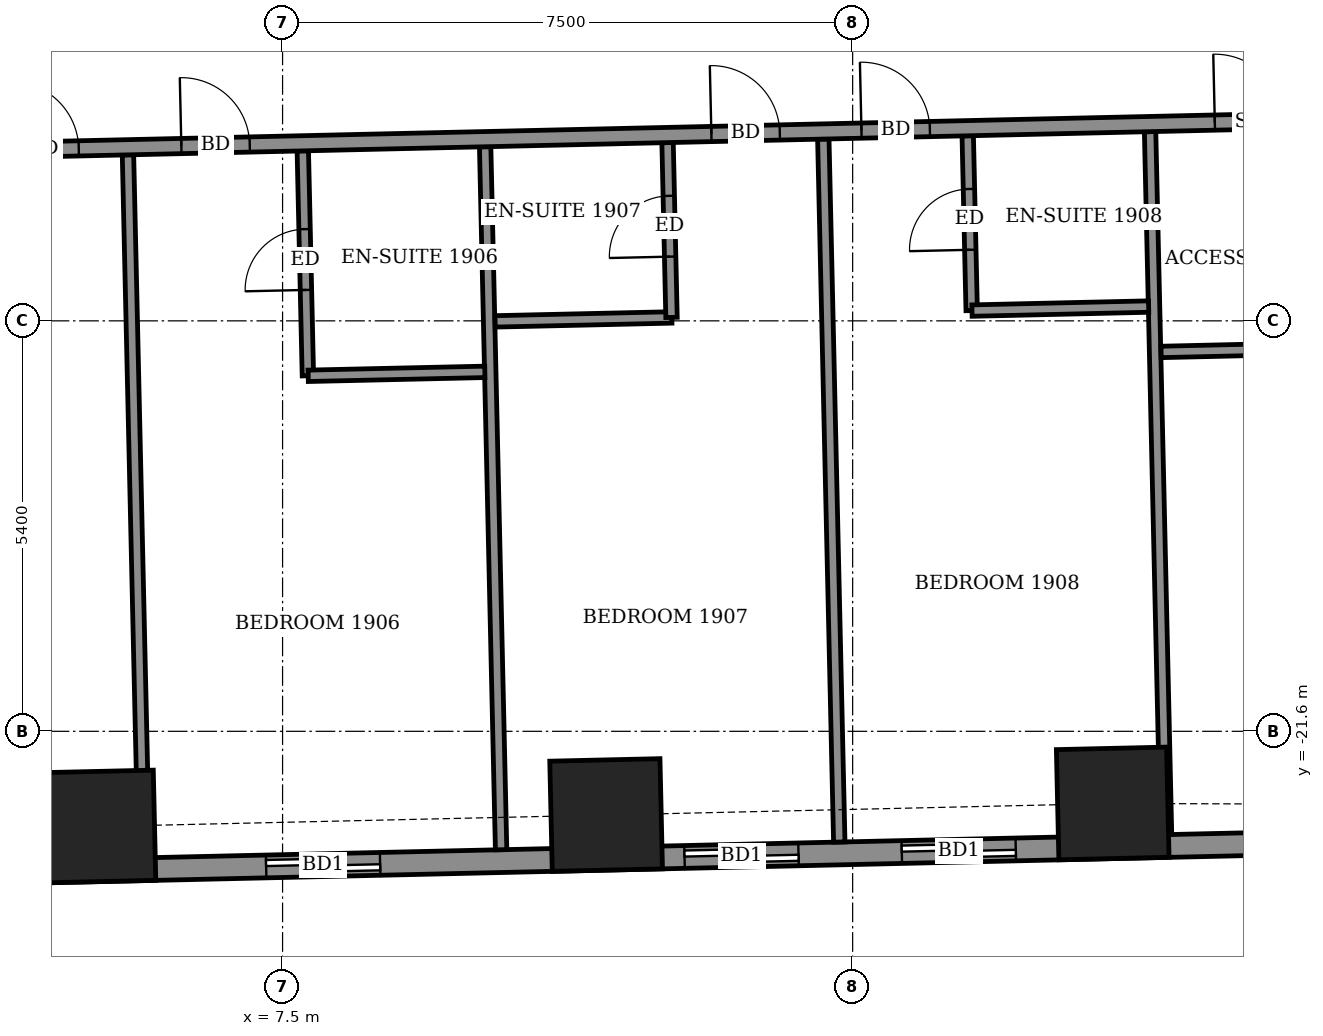
"""IFC4 building model, lengths in metres.
Left out: names, types, materials, properties, quantities, classifications, styles, units other than length and angle.
Written with IfcOpenShell. Run it as: python <this file> out.ifc"""

import sys

from ifc_helpers import new_model, si_unit, direction, frame, frame_2d, origin, origin_2d, place, context, subcontext, project, spatial, rectangle, extrude, element, fill, save


model = new_model("IFC4")
c1 = context("Model", 3, precision=1e-05, world=origin(), true_north=direction((0.0, 1.0)))
c2 = subcontext(c1, "Body", "Model", "MODEL_VIEW")
j1 = project(units=[si_unit("LENGTHUNIT", "METRE"), si_unit("PLANEANGLEUNIT", "RADIAN")], contexts=[c1])
p1 = place(None, origin())
s1 = spatial("IfcSite", under=j1, at=p1, CompositionType="ELEMENT")
p2 = place(p1, origin())
s2 = spatial("IfcBuilding", under=s1, at=p2, CompositionType="ELEMENT")
p3 = place(p2, frame((0.0, 0.0, 79.3)))
s3 = spatial("IfcBuildingStorey", under=s2, at=p3, CompositionType="ELEMENT", Elevation=79.3)
for number, where, z_axis, x_axis in (
    (1, (5.091, -22.852, -0.55), (0.0, 0.0, 1.0), (1.0, 0.023, 0.0)),
    (2, (11.757, -22.701, -0.55), (0.0, 0.0, 1.0), (1.0, 0.023, 0.0)),
    (3, (18.422, -22.549, -0.55), (0.0, 0.0, 1.0), (1.0, 0.023, 0.0)),
):
    element("IfcColumn", number, at=place(p3, frame(where, z_axis=z_axis, x_axis=x_axis)), inside=s3, PredefinedType="COLUMN", context=c2, shape_type="SweptSolid", body=[
        extrude(rectangle(XDim=1.45, YDim=1.45, at=origin_2d()), origin(), (0.0, 0.0, 1.0), 3.6),
    ])
p4 = place(p3, frame((-21.409, -24.029, 0.0), z_axis=(0.0, 0.0, 1.0), x_axis=(0.999742634032, 0.022686244721, 0.0)))
e4 = element("IfcWall", 4, at=p4, inside=s3, PredefinedType="SOLIDWALL", context=c2, shape_type="SweptSolid", body=[
    extrude(rectangle(XDim=46.372, YDim=0.3, at=frame_2d((23.186, 0.0))), origin(), (0.0, 0.0, 1.0), 3.05),
])
p5 = place(p4, frame((1.985, 0.0, 0.0)))
e5 = element("IfcOpeningElement", 5, at=p5, cuts=e4, PredefinedType="OPENING", context=c2, shape_type="SweptSolid", body=[
    extrude(rectangle(XDim=1.5, YDim=2.4, at=frame_2d((0.75, 1.2))), frame((0.0, 0.16, 0.0), z_axis=(0.0, -1.0, 0.0), x_axis=(1.0, 0.0, 0.0)), (0.0, 0.0, 1.0), 0.32),
])
p6 = place(p4, frame((7.371, 0.0, 0.0)))
e6 = element("IfcOpeningElement", 6, at=p6, cuts=e4, PredefinedType="OPENING", context=c2, shape_type="SweptSolid", body=[
    extrude(rectangle(XDim=1.2, YDim=2.4, at=frame_2d((0.6, 1.2))), frame((0.0, 0.16, 0.0), z_axis=(0.0, -1.0, 0.0), x_axis=(1.0, 0.0, 0.0)), (0.0, 0.0, 1.0), 0.32),
])
p7 = place(p4, frame((10.08, 0.0, 0.0)))
e7 = element("IfcOpeningElement", 7, at=p7, cuts=e4, PredefinedType="OPENING", context=c2, shape_type="SweptSolid", body=[
    extrude(rectangle(XDim=1.5, YDim=2.4, at=frame_2d((0.75, 1.2))), frame((0.0, 0.16, 0.0), z_axis=(0.0, -1.0, 0.0), x_axis=(1.0, 0.0, 0.0)), (0.0, 0.0, 1.0), 0.32),
])
p8 = place(p4, frame((15.08, 0.0, 0.0)))
e8 = element("IfcOpeningElement", 8, at=p8, cuts=e4, PredefinedType="OPENING", context=c2, shape_type="SweptSolid", body=[
    extrude(rectangle(XDim=1.5, YDim=2.4, at=frame_2d((0.75, 1.2))), frame((0.0, 0.16, 0.0), z_axis=(0.0, -1.0, 0.0), x_axis=(1.0, 0.0, 0.0)), (0.0, 0.0, 1.0), 0.32),
])
p9 = place(p4, frame((20.813, 0.0, 0.0)))
e9 = element("IfcOpeningElement", 9, at=p9, cuts=e4, PredefinedType="OPENING", context=c2, shape_type="SweptSolid", body=[
    extrude(rectangle(XDim=1.2, YDim=2.4, at=frame_2d((0.6, 1.2))), frame((0.0, 0.16, 0.0), z_axis=(0.0, -1.0, 0.0), x_axis=(1.0, 0.0, 0.0)), (0.0, 0.0, 1.0), 0.32),
])
p10 = place(p4, frame((23.522, 0.0, 0.0)))
e10 = element("IfcOpeningElement", 10, at=p10, cuts=e4, PredefinedType="OPENING", context=c2, shape_type="SweptSolid", body=[
    extrude(rectangle(XDim=1.5, YDim=2.4, at=frame_2d((0.75, 1.2))), frame((0.0, 0.16, 0.0), z_axis=(0.0, -1.0, 0.0), x_axis=(1.0, 0.0, 0.0)), (0.0, 0.0, 1.0), 0.32),
])
p11 = place(p4, frame((28.7, 0.0, 0.0)))
e11 = element("IfcOpeningElement", 11, at=p11, cuts=e4, PredefinedType="OPENING", context=c2, shape_type="SweptSolid", body=[
    extrude(rectangle(XDim=1.5, YDim=2.4, at=frame_2d((0.75, 1.2))), frame((0.0, 0.16, 0.0), z_axis=(0.0, -1.0, 0.0), x_axis=(1.0, 0.0, 0.0)), (0.0, 0.0, 1.0), 0.32),
])
p12 = place(p4, frame((34.206, 0.0, 0.0)))
e12 = element("IfcOpeningElement", 12, at=p12, cuts=e4, PredefinedType="OPENING", context=c2, shape_type="SweptSolid", body=[
    extrude(rectangle(XDim=1.5, YDim=2.4, at=frame_2d((0.75, 1.2))), frame((0.0, 0.16, 0.0), z_axis=(0.0, -1.0, 0.0), x_axis=(1.0, 0.0, 0.0)), (0.0, 0.0, 1.0), 0.32),
])
p13 = place(p4, frame((37.065, 0.0, 0.0)))
e13 = element("IfcOpeningElement", 13, at=p13, cuts=e4, PredefinedType="OPENING", context=c2, shape_type="SweptSolid", body=[
    extrude(rectangle(XDim=1.5, YDim=2.4, at=frame_2d((0.75, 1.2))), frame((0.0, 0.16, 0.0), z_axis=(0.0, -1.0, 0.0), x_axis=(1.0, 0.0, 0.0)), (0.0, 0.0, 1.0), 0.32),
])
p14 = place(p4, frame((41.698, 0.0, 0.9)))
e14 = element("IfcOpeningElement", 14, at=p14, cuts=e4, PredefinedType="OPENING", context=c2, shape_type="SweptSolid", body=[
    extrude(rectangle(XDim=2.4, YDim=1.5, at=frame_2d((1.2, 0.75))), frame((0.0, 0.16, 0.0), z_axis=(0.0, -1.0, 0.0), x_axis=(1.0, 0.0, 0.0)), (0.0, 0.0, 1.0), 0.32),
])
p15 = place(p3, frame((5.676, -23.264, 0.0), z_axis=(0.0, 0.0, 1.0), x_axis=(-0.022698023584, 0.999742366675, 0.0)))
e15 = element("IfcWall", 15, at=p15, inside=s3, PredefinedType="PARTITIONING", context=c2, shape_type="SweptSolid", body=[
    extrude(rectangle(XDim=9.25, YDim=0.15, at=frame_2d((4.625, 0.0))), origin(), (0.0, 0.0, 1.0), 3.05),
])
p16 = place(p3, frame((10.375, -23.158, 0.0), z_axis=(0.0, 0.0, 1.0), x_axis=(-0.022697424684, 0.999742380272, 0.0)))
e16 = element("IfcWall", 16, at=p16, inside=s3, PredefinedType="PARTITIONING", context=c2, shape_type="SweptSolid", body=[
    extrude(rectangle(XDim=9.25, YDim=0.15, at=frame_2d((4.625, 0.0))), origin(), (0.0, 0.0, 1.0), 2.55),
])
p17 = place(p3, frame((14.824, -23.057, 0.0), z_axis=(0.0, 0.0, 1.0), x_axis=(-0.022698023584, 0.999742366675, 0.0)))
e17 = element("IfcWall", 17, at=p17, inside=s3, PredefinedType="PARTITIONING", context=c2, shape_type="SweptSolid", body=[
    extrude(rectangle(XDim=9.25, YDim=0.15, at=frame_2d((4.625, 0.0))), origin(), (0.0, 0.0, 1.0), 2.55),
])
p18 = place(p3, frame((19.123, -22.959, 0.0), z_axis=(0.0, 0.0, 1.0), x_axis=(-0.022697424684, 0.999742380272, 0.0)))
e18 = element("IfcWall", 18, at=p18, inside=s3, PredefinedType="PARTITIONING", context=c2, shape_type="SweptSolid", body=[
    extrude(rectangle(XDim=9.25, YDim=0.15, at=frame_2d((4.625, 0.0))), origin(), (0.0, 0.0, 1.0), 2.55),
])
p19 = place(p3, frame((7.833, -16.923, 0.0), z_axis=(0.0, 0.0, 1.0), x_axis=(-0.022601485787, 0.999744553794, 0.0)))
e19 = element("IfcWall", 19, at=p19, inside=s3, PredefinedType="PARTITIONING", context=c2, shape_type="SweptSolid", body=[
    extrude(rectangle(XDim=2.96, YDim=0.15, at=frame_2d((1.48, 0.0))), origin(), (0.0, 0.0, 1.0), 3.05),
])
p20 = place(p19, frame((1.13, 0.0, 0.0)))
e20 = element("IfcOpeningElement", 20, at=p20, cuts=e19, PredefinedType="OPENING", context=c2, shape_type="SweptSolid", body=[
    extrude(rectangle(XDim=0.8, YDim=2.1, at=frame_2d((0.4, 1.05))), frame((0.0, 0.085, 0.0), z_axis=(0.0, -1.0, 0.0), x_axis=(1.0, 0.0, 0.0)), (0.0, 0.0, 1.0), 0.17),
])
p21 = place(p3, frame((7.837, -16.923, 0.0), z_axis=(0.0, 0.0, 1.0), x_axis=(0.999749744571, 0.022370700241, 0.0)))
e21 = element("IfcWall", 21, at=p21, inside=s3, PredefinedType="PARTITIONING", context=c2, shape_type="SweptSolid", body=[
    extrude(rectangle(XDim=2.324, YDim=0.15, at=frame_2d((1.162, 0.0))), origin(), (0.0, 0.0, 1.0), 3.05),
])
p22 = place(p3, frame((19.058, -16.609, 0.0), z_axis=(0.0, 0.0, 1.0), x_axis=(0.999737322729, 0.022919108675, 0.0)))
e22 = element("IfcWall", 22, at=p22, inside=s3, PredefinedType="PARTITIONING", context=c2, shape_type="SweptSolid", body=[
    extrude(rectangle(XDim=2.525, YDim=0.15, at=frame_2d((1.262, 0.0))), origin(), (0.0, 0.0, 1.0), 3.05),
])
p23 = place(p3, frame((10.296, -16.207, 0.0), z_axis=(0.0, 0.0, 1.0), x_axis=(0.999750007167, 0.022358961731, 0.0)))
e23 = element("IfcWall", 23, at=p23, inside=s3, PredefinedType="PARTITIONING", context=c2, shape_type="SweptSolid", body=[
    extrude(rectangle(XDim=2.326, YDim=0.15, at=frame_2d((1.163, 0.0))), origin(), (0.0, 0.0, 1.0), 3.05),
])
p24 = place(p3, frame((12.617, -16.155, 0.0), z_axis=(0.0, 0.0, 1.0), x_axis=(-0.022603288534, 0.999744513037, 0.0)))
e24 = element("IfcWall", 24, at=p24, inside=s3, PredefinedType="PARTITIONING", context=c2, shape_type="SweptSolid", body=[
    extrude(rectangle(XDim=2.301, YDim=0.15, at=frame_2d((1.15, 0.0))), origin(), (0.0, 0.0, 1.0), 3.05),
])
p25 = place(p24, frame((0.8, 0.0, 0.0)))
e25 = element("IfcOpeningElement", 25, at=p25, cuts=e24, PredefinedType="OPENING", context=c2, shape_type="SweptSolid", body=[
    extrude(rectangle(XDim=0.8, YDim=2.1, at=frame_2d((0.4, 1.05))), frame((0.0, 0.085, 0.0), z_axis=(0.0, -1.0, 0.0), x_axis=(1.0, 0.0, 0.0)), (0.0, 0.0, 1.0), 0.17),
])
p26 = place(p3, frame((16.566, -16.065, 0.0), z_axis=(0.0, 0.0, 1.0), x_axis=(-0.022615284993, 0.999744241736, 0.0)))
e26 = element("IfcWall", 26, at=p26, inside=s3, PredefinedType="PARTITIONING", context=c2, shape_type="SweptSolid", body=[
    extrude(rectangle(XDim=2.299, YDim=0.15, at=frame_2d((1.15, 0.0))), origin(), (0.0, 0.0, 1.0), 3.05),
])
p27 = place(p26, frame((0.8, 0.0, 0.0)))
e27 = element("IfcOpeningElement", 27, at=p27, cuts=e26, PredefinedType="OPENING", context=c2, shape_type="SweptSolid", body=[
    extrude(rectangle(XDim=0.8, YDim=2.1, at=frame_2d((0.4, 1.05))), frame((0.0, 0.085, 0.0), z_axis=(0.0, -1.0, 0.0), x_axis=(1.0, 0.0, 0.0)), (0.0, 0.0, 1.0), 0.17),
])
p28 = place(p3, frame((16.57, -16.065, 0.0), z_axis=(0.0, 0.0, 1.0), x_axis=(0.999740260747, 0.02279059109, 0.0)))
e28 = element("IfcWall", 28, at=p28, inside=s3, PredefinedType="PARTITIONING", context=c2, shape_type="SweptSolid", body=[
    extrude(rectangle(XDim=2.324, YDim=0.15, at=frame_2d((1.162, 0.0))), origin(), (0.0, 0.0, 1.0), 3.05),
])
p29 = place(p3, frame((-24.249, -14.591, 0.0), z_axis=(0.0, 0.0, 1.0), x_axis=(0.999742227308, 0.022704161211, 0.0)))
e29 = element("IfcWall", 29, at=p29, inside=s3, PredefinedType="PARTITIONING", context=c2, shape_type="SweptSolid", body=[
    extrude(rectangle(XDim=52.421, YDim=0.2, at=frame_2d((26.211, 0.0))), origin(), (0.0, 0.0, 1.0), 3.05),
])
p30 = place(p29, frame((0.575, 0.0, 0.0)))
e30 = element("IfcOpeningElement", 30, at=p30, cuts=e29, PredefinedType="OPENING", context=c2, shape_type="SweptSolid", body=[
    extrude(rectangle(XDim=1.0, YDim=2.1, at=frame_2d((0.5, 1.05))), frame((0.0, 0.11, 0.0), z_axis=(0.0, -1.0, 0.0), x_axis=(1.0, 0.0, 0.0)), (0.0, 0.0, 1.0), 0.22),
])
p31 = place(p29, frame((5.225, 0.0, 0.0)))
e31 = element("IfcOpeningElement", 31, at=p31, cuts=e29, PredefinedType="OPENING", context=c2, shape_type="SweptSolid", body=[
    extrude(rectangle(XDim=0.9, YDim=2.1, at=frame_2d((0.45, 1.05))), frame((0.0, 0.11, 0.0), z_axis=(0.0, -1.0, 0.0), x_axis=(1.0, 0.0, 0.0)), (0.0, 0.0, 1.0), 0.22),
])
p32 = place(p29, frame((10.075, 0.0, 0.0)))
e32 = element("IfcOpeningElement", 32, at=p32, cuts=e29, PredefinedType="OPENING", context=c2, shape_type="SweptSolid", body=[
    extrude(rectangle(XDim=0.9, YDim=2.1, at=frame_2d((0.45, 1.05))), frame((0.0, 0.11, 0.0), z_axis=(0.0, -1.0, 0.0), x_axis=(1.0, 0.0, 0.0)), (0.0, 0.0, 1.0), 0.22),
])
p33 = place(p29, frame((12.1, 0.0, 0.0)))
e33 = element("IfcOpeningElement", 33, at=p33, cuts=e29, PredefinedType="OPENING", context=c2, shape_type="SweptSolid", body=[
    extrude(rectangle(XDim=0.9, YDim=2.1, at=frame_2d((0.45, 1.05))), frame((0.0, 0.11, 0.0), z_axis=(0.0, -1.0, 0.0), x_axis=(1.0, 0.0, 0.0)), (0.0, 0.0, 1.0), 0.22),
])
p34 = place(p29, frame((19.025, 0.0, 0.0)))
e34 = element("IfcOpeningElement", 34, at=p34, cuts=e29, PredefinedType="OPENING", context=c2, shape_type="SweptSolid", body=[
    extrude(rectangle(XDim=0.9, YDim=2.1, at=frame_2d((0.45, 1.05))), frame((0.0, 0.11, 0.0), z_axis=(0.0, -1.0, 0.0), x_axis=(1.0, 0.0, 0.0)), (0.0, 0.0, 1.0), 0.22),
])
p35 = place(p29, frame((21.225, 0.0, 0.0)))
e35 = element("IfcOpeningElement", 35, at=p35, cuts=e29, PredefinedType="OPENING", context=c2, shape_type="SweptSolid", body=[
    extrude(rectangle(XDim=0.9, YDim=2.1, at=frame_2d((0.45, 1.05))), frame((0.0, 0.11, 0.0), z_axis=(0.0, -1.0, 0.0), x_axis=(1.0, 0.0, 0.0)), (0.0, 0.0, 1.0), 0.22),
])
p36 = place(p29, frame((28.175, 0.0, 0.0)))
e36 = element("IfcOpeningElement", 36, at=p36, cuts=e29, PredefinedType="OPENING", context=c2, shape_type="SweptSolid", body=[
    extrude(rectangle(XDim=0.9, YDim=2.1, at=frame_2d((0.45, 1.05))), frame((0.0, 0.11, 0.0), z_axis=(0.0, -1.0, 0.0), x_axis=(1.0, 0.0, 0.0)), (0.0, 0.0, 1.0), 0.22),
])
p37 = place(p29, frame((30.425, 0.0, 0.0)))
e37 = element("IfcOpeningElement", 37, at=p37, cuts=e29, PredefinedType="OPENING", context=c2, shape_type="SweptSolid", body=[
    extrude(rectangle(XDim=0.9, YDim=2.1, at=frame_2d((0.45, 1.05))), frame((0.0, 0.11, 0.0), z_axis=(0.0, -1.0, 0.0), x_axis=(1.0, 0.0, 0.0)), (0.0, 0.0, 1.0), 0.22),
])
p38 = place(p29, frame((37.4, 0.0, 0.0)))
e38 = element("IfcOpeningElement", 38, at=p38, cuts=e29, PredefinedType="OPENING", context=c2, shape_type="SweptSolid", body=[
    extrude(rectangle(XDim=0.9, YDim=2.1, at=frame_2d((0.45, 1.05))), frame((0.0, 0.11, 0.0), z_axis=(0.0, -1.0, 0.0), x_axis=(1.0, 0.0, 0.0)), (0.0, 0.0, 1.0), 0.22),
])
p39 = place(p29, frame((39.375, 0.0, 0.0)))
e39 = element("IfcOpeningElement", 39, at=p39, cuts=e29, PredefinedType="OPENING", context=c2, shape_type="SweptSolid", body=[
    extrude(rectangle(XDim=0.9, YDim=2.1, at=frame_2d((0.45, 1.05))), frame((0.0, 0.11, 0.0), z_axis=(0.0, -1.0, 0.0), x_axis=(1.0, 0.0, 0.0)), (0.0, 0.0, 1.0), 0.22),
])
p40 = place(p29, frame((49.661, 0.0, 0.0)))
e40 = element("IfcOpeningElement", 40, at=p40, cuts=e29, PredefinedType="OPENING", context=c2, shape_type="SweptSolid", body=[
    extrude(rectangle(XDim=1.0, YDim=2.1, at=frame_2d((0.5, 1.05))), frame((0.0, 0.11, 0.0), z_axis=(0.0, -1.0, 0.0), x_axis=(1.0, 0.0, 0.0)), (0.0, 0.0, 1.0), 0.22),
])
p41 = place(p29, frame((44.025, 0.0, 0.0)))
e41 = element("IfcOpeningElement", 41, at=p41, cuts=e29, PredefinedType="OPENING", context=c2, shape_type="SweptSolid", body=[
    extrude(rectangle(XDim=0.9, YDim=2.1, at=frame_2d((0.45, 1.05))), frame((0.0, 0.11, 0.0), z_axis=(0.0, -1.0, 0.0), x_axis=(1.0, 0.0, 0.0)), (0.0, 0.0, 1.0), 0.22),
])
p42 = place(p11, origin())
e42 = element("IfcDoor", 42, at=p42, inside=s3, OperationType="SLIDING_TO_LEFT", PredefinedType="DOOR", context=c2, shape_type="SweptSolid", body=[
    extrude(rectangle(XDim=1.5, YDim=2.4, at=frame_2d((0.75, 1.2))), frame((0.0, 0.025, 0.0), z_axis=(0.0, -1.0, 0.0), x_axis=(1.0, 0.0, 0.0)), (0.0, 0.0, 1.0), 0.05),
])
fill(e11, e42)
p43 = place(p12, origin())
e43 = element("IfcDoor", 43, at=p43, inside=s3, OperationType="SLIDING_TO_LEFT", PredefinedType="DOOR", context=c2, shape_type="SweptSolid", body=[
    extrude(rectangle(XDim=1.5, YDim=2.4, at=frame_2d((0.75, 1.2))), frame((0.0, 0.025, 0.0), z_axis=(0.0, -1.0, 0.0), x_axis=(1.0, 0.0, 0.0)), (0.0, 0.0, 1.0), 0.05),
])
fill(e12, e43)
p44 = place(p13, origin())
e44 = element("IfcDoor", 44, at=p44, inside=s3, OperationType="SLIDING_TO_LEFT", PredefinedType="DOOR", context=c2, shape_type="SweptSolid", body=[
    extrude(rectangle(XDim=1.5, YDim=2.4, at=frame_2d((0.75, 1.2))), frame((0.0, 0.025, 0.0), z_axis=(0.0, -1.0, 0.0), x_axis=(1.0, 0.0, 0.0)), (0.0, 0.0, 1.0), 0.05),
])
fill(e13, e44)
p45 = place(p36, origin())
e45 = element("IfcDoor", 45, at=p45, inside=s3, OperationType="SINGLE_SWING_LEFT", PredefinedType="DOOR", context=c2, shape_type="SweptSolid", body=[
    extrude(rectangle(XDim=0.9, YDim=2.1, at=frame_2d((0.45, 1.05))), frame((0.0, 0.025, 0.0), z_axis=(0.0, -1.0, 0.0), x_axis=(1.0, 0.0, 0.0)), (0.0, 0.0, 1.0), 0.05),
])
fill(e36, e45)
p46 = place(p37, origin())
e46 = element("IfcDoor", 46, at=p46, inside=s3, OperationType="SINGLE_SWING_RIGHT", PredefinedType="DOOR", context=c2, shape_type="SweptSolid", body=[
    extrude(rectangle(XDim=0.9, YDim=2.1, at=frame_2d((0.45, 1.05))), frame((0.0, 0.025, 0.0), z_axis=(0.0, -1.0, 0.0), x_axis=(1.0, 0.0, 0.0)), (0.0, 0.0, 1.0), 0.05),
])
fill(e37, e46)
p47 = place(p20, origin())
e47 = element("IfcDoor", 47, at=p47, inside=s3, OperationType="SINGLE_SWING_RIGHT", PredefinedType="DOOR", context=c2, shape_type="SweptSolid", body=[
    extrude(rectangle(XDim=0.8, YDim=2.1, at=frame_2d((0.4, 1.05))), frame((0.0, 0.025, 0.0), z_axis=(0.0, -1.0, 0.0), x_axis=(1.0, 0.0, 0.0)), (0.0, 0.0, 1.0), 0.05),
])
fill(e20, e47)
p48 = place(p38, origin())
e48 = element("IfcDoor", 48, at=p48, inside=s3, OperationType="SINGLE_SWING_LEFT", PredefinedType="DOOR", context=c2, shape_type="SweptSolid", body=[
    extrude(rectangle(XDim=0.9, YDim=2.1, at=frame_2d((0.45, 1.05))), frame((0.0, 0.025, 0.0), z_axis=(0.0, -1.0, 0.0), x_axis=(1.0, 0.0, 0.0)), (0.0, 0.0, 1.0), 0.05),
])
fill(e38, e48)
p49 = place(p25, origin())
e49 = element("IfcDoor", 49, at=p49, inside=s3, OperationType="SINGLE_SWING_LEFT", PredefinedType="DOOR", context=c2, shape_type="SweptSolid", body=[
    extrude(rectangle(XDim=0.8, YDim=2.1, at=frame_2d((0.4, 1.05))), frame((0.0, 0.025, 0.0), z_axis=(0.0, -1.0, 0.0), x_axis=(1.0, 0.0, 0.0)), (0.0, 0.0, 1.0), 0.05),
])
fill(e25, e49)
p50 = place(p39, origin())
e50 = element("IfcDoor", 50, at=p50, inside=s3, OperationType="SINGLE_SWING_RIGHT", PredefinedType="DOOR", context=c2, shape_type="SweptSolid", body=[
    extrude(rectangle(XDim=0.9, YDim=2.1, at=frame_2d((0.45, 1.05))), frame((0.0, 0.025, 0.0), z_axis=(0.0, -1.0, 0.0), x_axis=(1.0, 0.0, 0.0)), (0.0, 0.0, 1.0), 0.05),
])
fill(e39, e50)
p51 = place(p27, origin())
e51 = element("IfcDoor", 51, at=p51, inside=s3, OperationType="SINGLE_SWING_RIGHT", PredefinedType="DOOR", context=c2, shape_type="SweptSolid", body=[
    extrude(rectangle(XDim=0.8, YDim=2.1, at=frame_2d((0.4, 1.05))), frame((0.0, 0.025, 0.0), z_axis=(0.0, -1.0, 0.0), x_axis=(1.0, 0.0, 0.0)), (0.0, 0.0, 1.0), 0.05),
])
fill(e27, e51)
p52 = place(p41, origin())
e52 = element("IfcDoor", 52, at=p52, inside=s3, OperationType="SINGLE_SWING_RIGHT", PredefinedType="DOOR", context=c2, shape_type="SweptSolid", body=[
    extrude(rectangle(XDim=0.9, YDim=2.1, at=frame_2d((0.45, 1.05))), frame((0.0, 0.025, 0.0), z_axis=(0.0, -1.0, 0.0), x_axis=(1.0, 0.0, 0.0)), (0.0, 0.0, 1.0), 0.05),
])
fill(e41, e52)
save(model, sys.argv[1])
